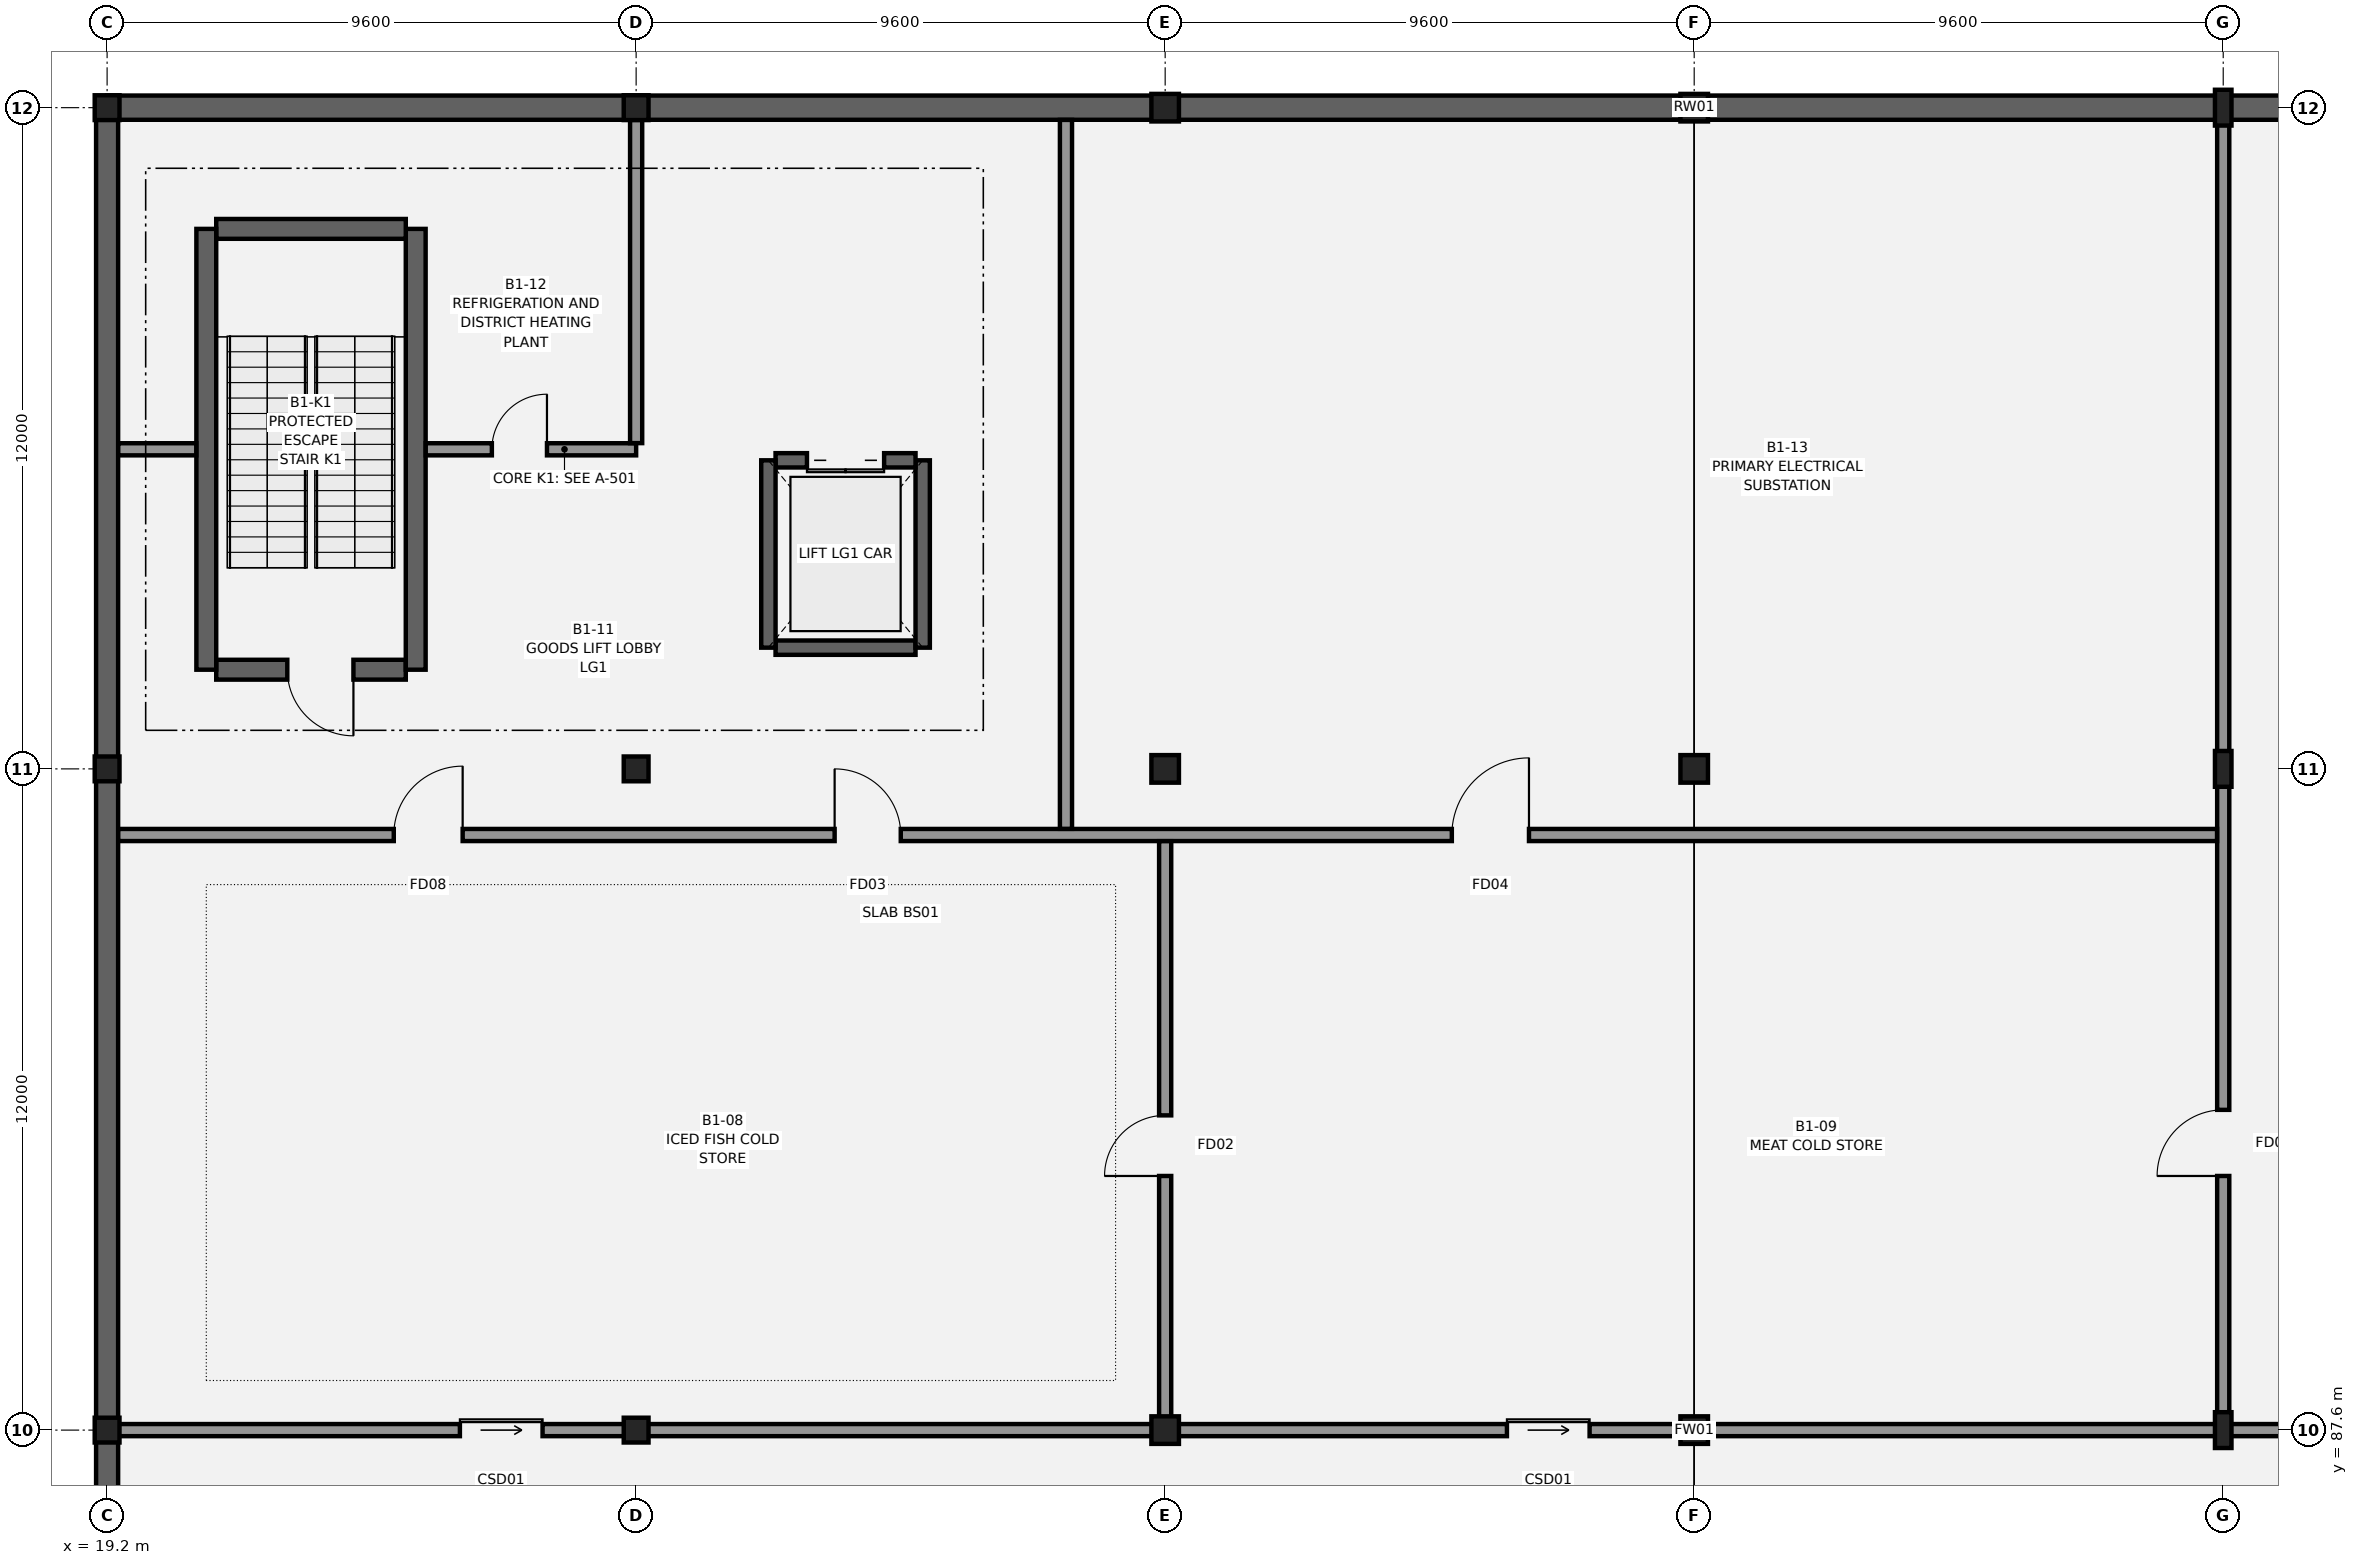
"""IFC4 building model, lengths in metres.
Left out: names, types, materials, properties, quantities, classifications, styles, units other than length and angle.
Written with IfcOpenShell. Run it as: python <this file> out.ifc"""

import sys

from ifc_helpers import new_model, si_unit, direction, frame, frame_2d, origin, origin_2d, place, context, subcontext, project, spatial, rectangle, i_section, extrude, element, fill, save


model = new_model("IFC4")
c1 = context("Model", 3, precision=1e-05, world=origin(), true_north=direction((0.0, 1.0)))
c2 = subcontext(c1, "Body", "Model", "MODEL_VIEW")
j1 = project(units=[si_unit("LENGTHUNIT", "METRE"), si_unit("PLANEANGLEUNIT", "RADIAN")], contexts=[c1])
p1 = place(None, origin())
s1 = spatial("IfcSite", under=j1, at=p1, CompositionType="ELEMENT")
p2 = place(p1, origin())
s2 = spatial("IfcBuilding", under=s1, at=p2, CompositionType="ELEMENT")
p3 = place(p2, frame((0.0, 0.0, -4.8)))
s3 = spatial("IfcBuildingStorey", under=s2, at=p3, CompositionType="ELEMENT", Elevation=-4.8)
p4 = place(p3, frame((76.8, 111.6, 0.0), z_axis=(0.0, 0.0, 1.0), x_axis=(-1.0, 0.0, 0.0)))
e1 = element("IfcWall", 1, at=p4, inside=s3, PredefinedType="USERDEFINED", context=c2, shape_type="SweptSolid", body=[
    extrude(rectangle(XDim=57.6, YDim=0.44, at=frame_2d((28.8, 0.0))), origin(), (0.0, 0.0, 1.0), 4.46),
])
p5 = place(p3, frame((19.2, 111.6, 0.0), z_axis=(0.0, 0.0, 1.0), x_axis=(0.0, -1.0, 0.0)))
e2 = element("IfcWall", 2, at=p5, inside=s3, PredefinedType="USERDEFINED", context=c2, shape_type="SweptSolid", body=[
    extrude(rectangle(XDim=60.0, YDim=0.4, at=frame_2d((30.0, 0.0))), origin(), (0.0, 0.0, 1.0), 4.46),
])
for number, where, z_axis, x_axis in (
    (3, (19.2, 87.6, 0.0), (0.0, 0.0, 1.0), (1.0, 0.0, 0.0)),
    (4, (19.2, 99.6, 0.0), (0.0, 0.0, 1.0), (1.0, 0.0, 0.0)),
    (5, (19.2, 111.6, 0.0), (0.0, 0.0, 1.0), (1.0, 0.0, 0.0)),
    (6, (28.8, 87.6, 0.0), (0.0, 0.0, 1.0), (1.0, 0.0, 0.0)),
    (7, (28.8, 99.6, 0.0), (0.0, 0.0, 1.0), (1.0, 0.0, 0.0)),
    (8, (28.8, 111.6, 0.0), (0.0, 0.0, 1.0), (1.0, 0.0, 0.0)),
):
    element("IfcColumn", number, at=place(p3, frame(where, z_axis=z_axis, x_axis=x_axis)), inside=s3, PredefinedType="COLUMN", context=c2, shape_type="SweptSolid", body=[
        extrude(rectangle(XDim=0.45, YDim=0.45, at=origin_2d()), origin(), (0.0, 0.0, 1.0), 4.8),
    ])
for number, where, z_axis, x_axis in (
    (9, (38.4, 87.6, 0.0), (0.0, 0.0, 1.0), (1.0, 0.0, 0.0)),
    (10, (38.4, 99.6, 0.0), (0.0, 0.0, 1.0), (1.0, 0.0, 0.0)),
    (11, (38.4, 111.6, 0.0), (0.0, 0.0, 1.0), (1.0, 0.0, 0.0)),
    (12, (48.0, 87.6, 0.0), (0.0, 0.0, 1.0), (1.0, 0.0, 0.0)),
    (13, (48.0, 99.6, 0.0), (0.0, 0.0, 1.0), (1.0, 0.0, 0.0)),
    (14, (48.0, 111.6, 0.0), (0.0, 0.0, 1.0), (1.0, 0.0, 0.0)),
):
    element("IfcColumn", number, at=place(p3, frame(where, z_axis=z_axis, x_axis=x_axis)), inside=s3, PredefinedType="COLUMN", context=c2, shape_type="SweptSolid", body=[
        extrude(rectangle(XDim=0.5, YDim=0.5, at=origin_2d()), origin(), (0.0, 0.0, 1.0), 4.8),
    ])
for number, where, z_axis, x_axis in (
    (15, (57.6, 87.6, 0.0), (0.0, 0.0, 1.0), (1.0, 0.0, 0.0)),
    (16, (57.6, 99.6, 0.0), (0.0, 0.0, 1.0), (1.0, 0.0, 0.0)),
    (17, (57.6, 111.6, 0.0), (0.0, 0.0, 1.0), (1.0, 0.0, 0.0)),
):
    element("IfcColumn", number, at=place(p3, frame(where, z_axis=z_axis, x_axis=x_axis)), inside=s3, PredefinedType="COLUMN", context=c2, shape_type="SweptSolid", body=[
        extrude(i_section(OverallWidth=0.3, OverallDepth=0.65, WebThickness=0.016, FlangeThickness=0.031, FilletRadius=0.027, at=origin_2d()), origin(), (0.0, 0.0, 1.0), 4.8),
    ])
p6 = place(p3, frame((24.62, 101.4, 0.0), z_axis=(0.0, 0.0, 1.0), x_axis=(-1.0, 0.0, 0.0)))
e18 = element("IfcWall", 18, at=p6, inside=s3, PredefinedType="SHEAR", context=c2, shape_type="SweptSolid", body=[
    extrude(rectangle(XDim=3.44, YDim=0.36, at=frame_2d((1.72, 0.0))), origin(), (0.0, 0.0, 1.0), 4.46),
])
p7 = place(p6, frame((0.95, 0.0, 0.0)))
e19 = element("IfcOpeningElement", 19, at=p7, cuts=e18, PredefinedType="OPENING", context=c2, shape_type="SweptSolid", body=[
    extrude(rectangle(XDim=1.2, YDim=2.2, at=frame_2d((0.6, 1.1))), frame((0.0, 0.19, 0.0), z_axis=(0.0, -1.0, 0.0), x_axis=(1.0, 0.0, 0.0)), (0.0, 0.0, 1.0), 0.38),
])
p8 = place(p3, frame((24.8, 101.4, 0.0), z_axis=(0.0, 0.0, 1.0), x_axis=(0.0, 1.0, 0.0)))
e20 = element("IfcWall", 20, at=p8, inside=s3, PredefinedType="SHEAR", context=c2, shape_type="SweptSolid", body=[
    extrude(rectangle(XDim=8.0, YDim=0.36, at=frame_2d((4.0, 0.0))), origin(), (0.0, 0.0, 1.0), 4.46),
])
p9 = place(p3, frame((24.62, 109.4, 0.0), z_axis=(0.0, 0.0, 1.0), x_axis=(-1.0, 0.0, 0.0)))
e21 = element("IfcWall", 21, at=p9, inside=s3, PredefinedType="SHEAR", context=c2, shape_type="SweptSolid", body=[
    extrude(rectangle(XDim=3.44, YDim=0.36, at=frame_2d((1.72, 0.0))), origin(), (0.0, 0.0, 1.0), 4.46),
])
p10 = place(p3, frame((21.0, 109.4, 0.0), z_axis=(0.0, 0.0, 1.0), x_axis=(0.0, -1.0, 0.0)))
e22 = element("IfcWall", 22, at=p10, inside=s3, PredefinedType="SHEAR", context=c2, shape_type="SweptSolid", body=[
    extrude(rectangle(XDim=8.0, YDim=0.36, at=frame_2d((4.0, 0.0))), origin(), (0.0, 0.0, 1.0), 4.46),
])
p11 = place(p3, frame((31.33, 101.8, 0.0), z_axis=(0.0, 0.0, 1.0), x_axis=(1.0, 0.0, 0.0)))
e23 = element("IfcWall", 23, at=p11, inside=s3, PredefinedType="SHEAR", context=c2, shape_type="SweptSolid", body=[
    extrude(rectangle(XDim=2.54, YDim=0.26, at=frame_2d((1.27, 0.0))), origin(), (0.0, 0.0, 1.0), 4.46),
])
p12 = place(p3, frame((34.0, 101.8, 0.0), z_axis=(0.0, 0.0, 1.0), x_axis=(0.0, 1.0, 0.0)))
e24 = element("IfcWall", 24, at=p12, inside=s3, PredefinedType="SHEAR", context=c2, shape_type="SweptSolid", body=[
    extrude(rectangle(XDim=3.4, YDim=0.26, at=frame_2d((1.7, 0.0))), origin(), (0.0, 0.0, 1.0), 4.46),
])
p13 = place(p3, frame((33.87, 105.2, 0.0), z_axis=(0.0, 0.0, 1.0), x_axis=(-1.0, 0.0, 0.0)))
e25 = element("IfcWall", 25, at=p13, inside=s3, PredefinedType="SHEAR", context=c2, shape_type="SweptSolid", body=[
    extrude(rectangle(XDim=2.54, YDim=0.26, at=frame_2d((1.27, 0.0))), origin(), (0.0, 0.0, 1.0), 4.46),
])
p14 = place(p13, frame((0.57, 0.0, 0.0)))
e26 = element("IfcOpeningElement", 26, at=p14, cuts=e25, PredefinedType="OPENING", context=c2, shape_type="SweptSolid", body=[
    extrude(rectangle(XDim=1.4, YDim=2.25, at=frame_2d((0.7, 1.125))), frame((0.0, 0.14, 0.0), z_axis=(0.0, -1.0, 0.0), x_axis=(1.0, 0.0, 0.0)), (0.0, 0.0, 1.0), 0.28),
])
p15 = place(p3, frame((31.2, 105.2, 0.0), z_axis=(0.0, 0.0, 1.0), x_axis=(0.0, -1.0, 0.0)))
e27 = element("IfcWall", 27, at=p15, inside=s3, PredefinedType="SHEAR", context=c2, shape_type="SweptSolid", body=[
    extrude(rectangle(XDim=3.4, YDim=0.26, at=frame_2d((1.7, 0.0))), origin(), (0.0, 0.0, 1.0), 4.46),
])
p16 = place(p3, frame((19.402, 87.6, 0.0), z_axis=(0.0, 0.0, 1.0), x_axis=(1.0, 0.0, 0.0)))
e28 = element("IfcWall", 28, at=p16, inside=s3, PredefinedType="PARTITIONING", context=c2, shape_type="SweptSolid", body=[
    extrude(rectangle(XDim=57.196, YDim=0.22, at=frame_2d((28.598, 0.0))), origin(), (0.0, 0.0, 1.0), 3.905),
])
p17 = place(p16, frame((6.2, 0.0, 0.0)))
e29 = element("IfcOpeningElement", 29, at=p17, cuts=e28, PredefinedType="OPENING", context=c2, shape_type="SweptSolid", body=[
    extrude(rectangle(XDim=1.5, YDim=2.4, at=frame_2d((0.75, 1.2))), frame((0.0, 0.12, 0.0), z_axis=(0.0, -1.0, 0.0), x_axis=(1.0, 0.0, 0.0)), (0.0, 0.0, 1.0), 0.24),
])
p18 = place(p16, frame((25.2, 0.0, 0.0)))
e30 = element("IfcOpeningElement", 30, at=p18, cuts=e28, PredefinedType="OPENING", context=c2, shape_type="SweptSolid", body=[
    extrude(rectangle(XDim=1.5, YDim=2.4, at=frame_2d((0.75, 1.2))), frame((0.0, 0.12, 0.0), z_axis=(0.0, -1.0, 0.0), x_axis=(1.0, 0.0, 0.0)), (0.0, 0.0, 1.0), 0.24),
])
p19 = place(p16, frame((44.2, 0.0, 0.0)))
e31 = element("IfcOpeningElement", 31, at=p19, cuts=e28, PredefinedType="OPENING", context=c2, shape_type="SweptSolid", body=[
    extrude(rectangle(XDim=1.2, YDim=2.2, at=frame_2d((0.6, 1.1))), frame((0.0, 0.12, 0.0), z_axis=(0.0, -1.0, 0.0), x_axis=(1.0, 0.0, 0.0)), (0.0, 0.0, 1.0), 0.24),
])
p20 = place(p3, frame((57.6, 87.712, 0.0), z_axis=(0.0, 0.0, 1.0), x_axis=(0.0, 1.0, 0.0)))
e32 = element("IfcWall", 32, at=p20, inside=s3, PredefinedType="PARTITIONING", context=c2, shape_type="SweptSolid", body=[
    extrude(rectangle(XDim=23.666, YDim=0.22, at=frame_2d((11.833, 0.0))), origin(), (0.0, 0.0, 1.0), 3.855),
])
p21 = place(p20, frame((4.5, 0.0, 0.0)))
e33 = element("IfcOpeningElement", 33, at=p21, cuts=e32, PredefinedType="OPENING", context=c2, shape_type="SweptSolid", body=[
    extrude(rectangle(XDim=1.2, YDim=2.2, at=frame_2d((0.6, 1.1))), frame((0.0, 0.12, 0.0), z_axis=(0.0, -1.0, 0.0), x_axis=(1.0, 0.0, 0.0)), (0.0, 0.0, 1.0), 0.24),
])
p22 = place(p3, frame((19.402, 98.4, 0.0), z_axis=(0.0, 0.0, 1.0), x_axis=(1.0, 0.0, 0.0)))
e34 = element("IfcWall", 34, at=p22, inside=s3, PredefinedType="PARTITIONING", context=c2, shape_type="SweptSolid", body=[
    extrude(rectangle(XDim=38.086, YDim=0.22, at=frame_2d((19.043, 0.0))), origin(), (0.0, 0.0, 1.0), 4.44),
])
p23 = place(p22, frame((5.0, 0.0, 0.0)))
e35 = element("IfcOpeningElement", 35, at=p23, cuts=e34, PredefinedType="OPENING", context=c2, shape_type="SweptSolid", body=[
    extrude(rectangle(XDim=1.25, YDim=2.15, at=frame_2d((0.625, 1.075))), frame((0.0, 0.12, 0.0), z_axis=(0.0, -1.0, 0.0), x_axis=(1.0, 0.0, 0.0)), (0.0, 0.0, 1.0), 0.24),
])
p24 = place(p22, frame((13.0, 0.0, 0.0)))
e36 = element("IfcOpeningElement", 36, at=p24, cuts=e34, PredefinedType="OPENING", context=c2, shape_type="SweptSolid", body=[
    extrude(rectangle(XDim=1.2, YDim=2.2, at=frame_2d((0.6, 1.1))), frame((0.0, 0.12, 0.0), z_axis=(0.0, -1.0, 0.0), x_axis=(1.0, 0.0, 0.0)), (0.0, 0.0, 1.0), 0.24),
])
p25 = place(p22, frame((24.2, 0.0, 0.0)))
e37 = element("IfcOpeningElement", 37, at=p25, cuts=e34, PredefinedType="OPENING", context=c2, shape_type="SweptSolid", body=[
    extrude(rectangle(XDim=1.4, YDim=2.2, at=frame_2d((0.7, 1.1))), frame((0.0, 0.12, 0.0), z_axis=(0.0, -1.0, 0.0), x_axis=(1.0, 0.0, 0.0)), (0.0, 0.0, 1.0), 0.24),
])
p26 = place(p3, frame((38.4, 87.712, 0.0), z_axis=(0.0, 0.0, 1.0), x_axis=(0.0, 1.0, 0.0)))
e38 = element("IfcWall", 38, at=p26, inside=s3, PredefinedType="PARTITIONING", context=c2, shape_type="SweptSolid", body=[
    extrude(rectangle(XDim=10.576, YDim=0.22, at=frame_2d((5.288, 0.0))), origin(), (0.0, 0.0, 1.0), 3.915),
])
p27 = place(p26, frame((4.5, 0.0, 0.0)))
e39 = element("IfcOpeningElement", 39, at=p27, cuts=e38, PredefinedType="OPENING", context=c2, shape_type="SweptSolid", body=[
    extrude(rectangle(XDim=1.1, YDim=2.15, at=frame_2d((0.55, 1.075))), frame((0.0, 0.12, 0.0), z_axis=(0.0, -1.0, 0.0), x_axis=(1.0, 0.0, 0.0)), (0.0, 0.0, 1.0), 0.24),
])
p28 = place(p3, frame((36.6, 98.512, 0.0), z_axis=(0.0, 0.0, 1.0), x_axis=(0.0, 1.0, 0.0)))
e40 = element("IfcWall", 40, at=p28, inside=s3, PredefinedType="PARTITIONING", context=c2, shape_type="SweptSolid", body=[
    extrude(rectangle(XDim=12.866, YDim=0.22, at=frame_2d((6.433, 0.0))), origin(), (0.0, 0.0, 1.0), 4.44),
])
p29 = place(p3, frame((19.402, 105.4, 0.0), z_axis=(0.0, 0.0, 1.0), x_axis=(1.0, 0.0, 0.0)))
e41 = element("IfcWall", 41, at=p29, inside=s3, PredefinedType="PARTITIONING", context=c2, shape_type="SweptSolid", body=[
    extrude(rectangle(XDim=1.416, YDim=0.22, at=frame_2d((0.708, 0.0))), origin(), (0.0, 0.0, 1.0), 4.44),
])
p30 = place(p3, frame((24.982, 105.4, 0.0), z_axis=(0.0, 0.0, 1.0), x_axis=(1.0, 0.0, 0.0)))
e42 = element("IfcWall", 42, at=p30, inside=s3, PredefinedType="PARTITIONING", context=c2, shape_type="SweptSolid", body=[
    extrude(rectangle(XDim=3.818, YDim=0.22, at=frame_2d((1.909, 0.0))), origin(), (0.0, 0.0, 1.0), 4.44),
])
p31 = place(p30, frame((1.2, 0.0, 0.0)))
e43 = element("IfcOpeningElement", 43, at=p31, cuts=e42, PredefinedType="OPENING", context=c2, shape_type="SweptSolid", body=[
    extrude(rectangle(XDim=1.0, YDim=2.15, at=frame_2d((0.5, 1.075))), frame((0.0, 0.12, 0.0), z_axis=(0.0, -1.0, 0.0), x_axis=(1.0, 0.0, 0.0)), (0.0, 0.0, 1.0), 0.24),
])
p32 = place(p3, frame((28.8, 105.512, 0.0), z_axis=(0.0, 0.0, 1.0), x_axis=(0.0, 1.0, 0.0)))
e44 = element("IfcWall", 44, at=p32, inside=s3, PredefinedType="PARTITIONING", context=c2, shape_type="SweptSolid", body=[
    extrude(rectangle(XDim=5.866, YDim=0.22, at=frame_2d((2.933, 0.0))), origin(), (0.0, 0.0, 1.0), 3.915),
])
p33 = place(p17, origin())
e45 = element("IfcDoor", 45, at=p33, inside=s3, OperationType="SLIDING_TO_RIGHT", PredefinedType="DOOR", context=c2, shape_type="SweptSolid", body=[
    extrude(rectangle(XDim=1.5, YDim=2.4, at=frame_2d((0.75, 1.2))), frame((0.0, 0.025, 0.0), z_axis=(0.0, -1.0, 0.0), x_axis=(1.0, 0.0, 0.0)), (0.0, 0.0, 1.0), 0.05),
])
fill(e29, e45)
p34 = place(p18, origin())
e46 = element("IfcDoor", 46, at=p34, inside=s3, OperationType="SLIDING_TO_RIGHT", PredefinedType="DOOR", context=c2, shape_type="SweptSolid", body=[
    extrude(rectangle(XDim=1.5, YDim=2.4, at=frame_2d((0.75, 1.2))), frame((0.0, 0.025, 0.0), z_axis=(0.0, -1.0, 0.0), x_axis=(1.0, 0.0, 0.0)), (0.0, 0.0, 1.0), 0.05),
])
fill(e30, e46)
p35 = place(p21, origin())
e47 = element("IfcDoor", 47, at=p35, inside=s3, OperationType="SINGLE_SWING_LEFT", PredefinedType="DOOR", context=c2, shape_type="SweptSolid", body=[
    extrude(rectangle(XDim=1.2, YDim=2.2, at=frame_2d((0.6, 1.1))), frame((0.0, 0.025, 0.0), z_axis=(0.0, -1.0, 0.0), x_axis=(1.0, 0.0, 0.0)), (0.0, 0.0, 1.0), 0.05),
])
fill(e33, e47)
p36 = place(p23, origin())
e48 = element("IfcDoor", 48, at=p36, inside=s3, OperationType="SINGLE_SWING_RIGHT", PredefinedType="DOOR", context=c2, shape_type="SweptSolid", body=[
    extrude(rectangle(XDim=1.25, YDim=2.15, at=frame_2d((0.625, 1.075))), frame((0.0, 0.025, 0.0), z_axis=(0.0, -1.0, 0.0), x_axis=(1.0, 0.0, 0.0)), (0.0, 0.0, 1.0), 0.05),
])
fill(e35, e48)
p37 = place(p24, origin())
e49 = element("IfcDoor", 49, at=p37, inside=s3, OperationType="SINGLE_SWING_LEFT", PredefinedType="DOOR", context=c2, shape_type="SweptSolid", body=[
    extrude(rectangle(XDim=1.2, YDim=2.2, at=frame_2d((0.6, 1.1))), frame((0.0, 0.025, 0.0), z_axis=(0.0, -1.0, 0.0), x_axis=(1.0, 0.0, 0.0)), (0.0, 0.0, 1.0), 0.05),
])
fill(e36, e49)
p38 = place(p25, origin())
e50 = element("IfcDoor", 50, at=p38, inside=s3, OperationType="SINGLE_SWING_RIGHT", PredefinedType="DOOR", context=c2, shape_type="SweptSolid", body=[
    extrude(rectangle(XDim=1.4, YDim=2.2, at=frame_2d((0.7, 1.1))), frame((0.0, 0.025, 0.0), z_axis=(0.0, -1.0, 0.0), x_axis=(1.0, 0.0, 0.0)), (0.0, 0.0, 1.0), 0.05),
])
fill(e37, e50)
p39 = place(p27, origin())
e51 = element("IfcDoor", 51, at=p39, inside=s3, OperationType="SINGLE_SWING_LEFT", PredefinedType="DOOR", context=c2, shape_type="SweptSolid", body=[
    extrude(rectangle(XDim=1.1, YDim=2.15, at=frame_2d((0.55, 1.075))), frame((0.0, 0.025, 0.0), z_axis=(0.0, -1.0, 0.0), x_axis=(1.0, 0.0, 0.0)), (0.0, 0.0, 1.0), 0.05),
])
fill(e39, e51)
p40 = place(p31, origin())
e52 = element("IfcDoor", 52, at=p40, inside=s3, OperationType="SINGLE_SWING_RIGHT", PredefinedType="DOOR", context=c2, shape_type="SweptSolid", body=[
    extrude(rectangle(XDim=1.0, YDim=2.15, at=frame_2d((0.5, 1.075))), frame((0.0, 0.025, 0.0), z_axis=(0.0, -1.0, 0.0), x_axis=(1.0, 0.0, 0.0)), (0.0, 0.0, 1.0), 0.05),
])
fill(e43, e52)
p41 = place(p7, origin())
e53 = element("IfcDoor", 53, at=p41, inside=s3, OperationType="SINGLE_SWING_LEFT", PredefinedType="DOOR", context=c2, shape_type="SweptSolid", body=[
    extrude(rectangle(XDim=1.2, YDim=2.2, at=frame_2d((0.6, 1.1))), frame((0.0, 0.025, 0.0), z_axis=(0.0, -1.0, 0.0), x_axis=(1.0, 0.0, 0.0)), (0.0, 0.0, 1.0), 0.05),
])
fill(e19, e53)
p42 = place(p14, origin())
e54 = element("IfcDoor", 54, at=p42, inside=s3, OperationType="DOUBLE_DOOR_SLIDING", PredefinedType="DOOR", context=c2, shape_type="SweptSolid", body=[
    extrude(rectangle(XDim=1.4, YDim=2.25, at=frame_2d((0.7, 1.125))), frame((0.0, 0.025, 0.0), z_axis=(0.0, -1.0, 0.0), x_axis=(1.0, 0.0, 0.0)), (0.0, 0.0, 1.0), 0.05),
])
fill(e26, e54)
save(model, sys.argv[1])
